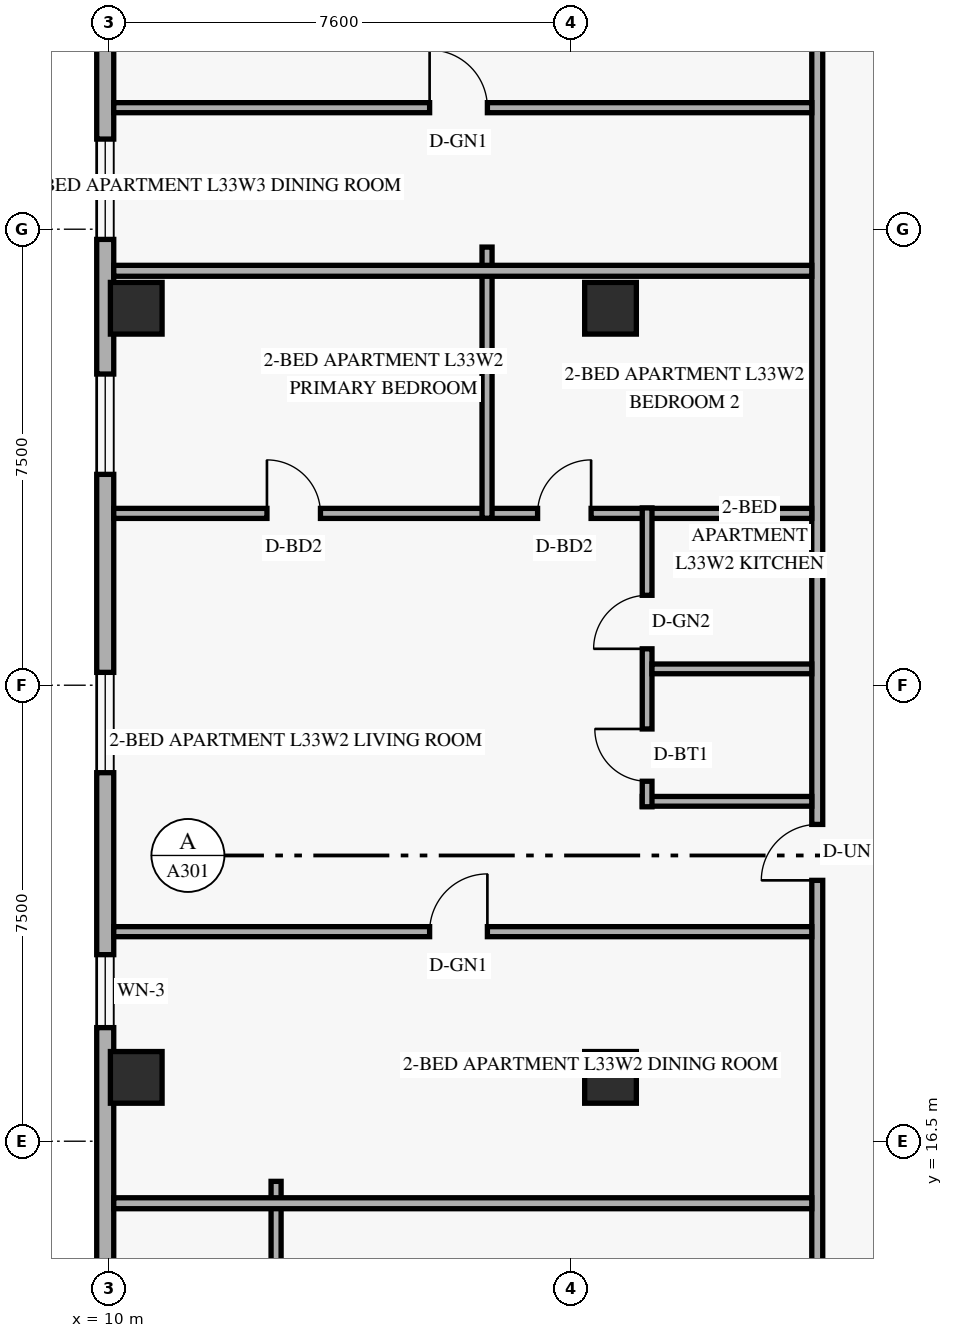
"""IFC4 building model, lengths in metres.
Left out: names, types, materials, properties, quantities, classifications, styles, units other than length and angle.
Written with IfcOpenShell. Run it as: python <this file> out.ifc"""

import sys

from ifc_helpers import new_model, si_unit, direction, frame, frame_2d, origin, origin_2d, place, context, subcontext, project, spatial, rectangle, extrude, element, fill, save


model = new_model("IFC4")
c1 = context("Model", 3, precision=1e-05, world=origin(), true_north=direction((0.0, 1.0)))
c2 = subcontext(c1, "Body", "Model", "MODEL_VIEW")
j1 = project(units=[si_unit("LENGTHUNIT", "METRE"), si_unit("PLANEANGLEUNIT", "RADIAN")], contexts=[c1])
p1 = place(None, origin())
s1 = spatial("IfcSite", under=j1, at=p1, CompositionType="ELEMENT")
p2 = place(p1, origin())
s2 = spatial("IfcBuilding", under=s1, at=p2, CompositionType="ELEMENT")
p3 = place(p2, frame((0.0, 0.0, 128.4)))
s3 = spatial("IfcBuildingStorey", under=s2, at=p3, CompositionType="ELEMENT", Elevation=128.4)
for number, where, z_axis, x_axis in (
    (1, (10.45, 17.55, 0.0), (0.0, 0.0, 1.0), (1.0, 0.0, 0.0)),
    (2, (10.45, 30.2, 0.0), (0.0, 0.0, 1.0), (1.0, 0.0, 0.0)),
    (3, (18.25, 17.55, 0.0), (0.0, 0.0, 1.0), (1.0, 0.0, 0.0)),
    (4, (18.25, 30.2, 0.0), (0.0, 0.0, 1.0), (1.0, 0.0, 0.0)),
):
    element("IfcColumn", number, at=place(p3, frame(where, z_axis=z_axis, x_axis=x_axis)), inside=s3, PredefinedType="COLUMN", context=c2, shape_type="SweptSolid", body=[
        extrude(rectangle(XDim=0.85, YDim=0.85, at=origin_2d()), origin(), (0.0, 0.0, 1.0), 3.6),
    ])
p4 = place(p3, frame((9.94, 41.68, 0.0), z_axis=(0.0, 0.0, 1.0), x_axis=(0.0, -1.0, 0.0)))
e5 = element("IfcWall", 5, at=p4, inside=s3, PredefinedType="SOLIDWALL", context=c2, shape_type="SweptSolid", body=[
    extrude(rectangle(XDim=35.36, YDim=0.28, at=frame_2d((17.68, 0.0))), origin(), (0.0, 0.0, 1.0), 3.36),
])
p5 = place(p4, frame((28.27, 0.0, 0.85)))
e6 = element("IfcOpeningElement", 6, at=p5, cuts=e5, PredefinedType="OPENING", context=c2, shape_type="SweptSolid", body=[
    extrude(rectangle(XDim=1.65, YDim=1.6, at=frame_2d((0.825, 0.8))), frame((0.0, 0.15, 0.0), z_axis=(0.0, -1.0, 0.0), x_axis=(1.0, 0.0, 0.0)), (0.0, 0.0, 1.0), 0.3),
])
p6 = place(p4, frame((22.112, 0.0, 0.85)))
e7 = element("IfcOpeningElement", 7, at=p6, cuts=e5, PredefinedType="OPENING", context=c2, shape_type="SweptSolid", body=[
    extrude(rectangle(XDim=1.2, YDim=1.5, at=frame_2d((0.6, 0.75))), frame((0.0, 0.15, 0.0), z_axis=(0.0, -1.0, 0.0), x_axis=(1.0, 0.0, 0.0)), (0.0, 0.0, 1.0), 0.3),
])
p7 = place(p4, frame((17.469, 0.0, 0.85)))
e8 = element("IfcOpeningElement", 8, at=p7, cuts=e5, PredefinedType="OPENING", context=c2, shape_type="SweptSolid", body=[
    extrude(rectangle(XDim=1.65, YDim=1.6, at=frame_2d((0.825, 0.8))), frame((0.0, 0.15, 0.0), z_axis=(0.0, -1.0, 0.0), x_axis=(1.0, 0.0, 0.0)), (0.0, 0.0, 1.0), 0.3),
])
p8 = place(p4, frame((12.562, 0.0, 0.85)))
e9 = element("IfcOpeningElement", 9, at=p8, cuts=e5, PredefinedType="OPENING", context=c2, shape_type="SweptSolid", body=[
    extrude(rectangle(XDim=1.65, YDim=1.6, at=frame_2d((0.825, 0.8))), frame((0.0, 0.15, 0.0), z_axis=(0.0, -1.0, 0.0), x_axis=(1.0, 0.0, 0.0)), (0.0, 0.0, 1.0), 0.3),
])
p9 = place(p4, frame((8.698, 0.0, 0.85)))
e10 = element("IfcOpeningElement", 10, at=p9, cuts=e5, PredefinedType="OPENING", context=c2, shape_type="SweptSolid", body=[
    extrude(rectangle(XDim=1.65, YDim=1.6, at=frame_2d((0.825, 0.8))), frame((0.0, 0.15, 0.0), z_axis=(0.0, -1.0, 0.0), x_axis=(1.0, 0.0, 0.0)), (0.0, 0.0, 1.0), 0.3),
])
p10 = place(p4, frame((4.95, 0.0, 0.85)))
e11 = element("IfcOpeningElement", 11, at=p10, cuts=e5, PredefinedType="OPENING", context=c2, shape_type="SweptSolid", body=[
    extrude(rectangle(XDim=1.65, YDim=1.6, at=frame_2d((0.825, 0.8))), frame((0.0, 0.15, 0.0), z_axis=(0.0, -1.0, 0.0), x_axis=(1.0, 0.0, 0.0)), (0.0, 0.0, 1.0), 0.3),
])
p11 = place(p3, frame((21.65, 6.8, 0.0), z_axis=(0.0, 0.0, 1.0), x_axis=(0.0, 1.0, 0.0)))
e12 = element("IfcWall", 12, at=p11, inside=s3, PredefinedType="STANDARD", context=c2, shape_type="SweptSolid", body=[
    extrude(rectangle(XDim=34.4, YDim=0.18, at=frame_2d((17.2, 0.0))), origin(), (0.0, 0.0, 1.0), 2.731),
])
p12 = place(p11, frame((5.107, 0.0, 0.0)))
e13 = element("IfcOpeningElement", 13, at=p12, cuts=e12, PredefinedType="OPENING", context=c2, shape_type="SweptSolid", body=[
    extrude(rectangle(XDim=0.92, YDim=2.15, at=frame_2d((0.46, 1.075))), frame((0.0, 0.1, 0.0), z_axis=(0.0, -1.0, 0.0), x_axis=(1.0, 0.0, 0.0)), (0.0, 0.0, 1.0), 0.2),
])
p13 = place(p11, frame((13.99, 0.0, 0.0)))
e14 = element("IfcOpeningElement", 14, at=p13, cuts=e12, PredefinedType="OPENING", context=c2, shape_type="SweptSolid", body=[
    extrude(rectangle(XDim=0.92, YDim=2.15, at=frame_2d((0.46, 1.075))), frame((0.0, 0.1, 0.0), z_axis=(0.0, -1.0, 0.0), x_axis=(1.0, 0.0, 0.0)), (0.0, 0.0, 1.0), 0.2),
])
p14 = place(p11, frame((28.646, 0.0, 0.0)))
e15 = element("IfcOpeningElement", 15, at=p14, cuts=e12, PredefinedType="OPENING", context=c2, shape_type="SweptSolid", body=[
    extrude(rectangle(XDim=0.92, YDim=2.15, at=frame_2d((0.46, 1.075))), frame((0.0, 0.1, 0.0), z_axis=(0.0, -1.0, 0.0), x_axis=(1.0, 0.0, 0.0)), (0.0, 0.0, 1.0), 0.2),
])
p15 = place(p3, frame((12.75, 6.76, 0.0), z_axis=(0.0, 0.0, 1.0), x_axis=(0.0, 1.0, 0.0)))
e16 = element("IfcWall", 16, at=p15, inside=s3, PredefinedType="PARTITIONING", context=c2, shape_type="SweptSolid", body=[
    extrude(rectangle(XDim=9.08, YDim=0.165, at=frame_2d((4.54, 0.0))), origin(), (0.0, 0.0, 1.0), 2.731),
])
p16 = place(p15, frame((3.78, 0.0, 0.0)))
e17 = element("IfcOpeningElement", 17, at=p16, cuts=e16, PredefinedType="OPENING", context=c2, shape_type="SweptSolid", body=[
    extrude(rectangle(XDim=0.95, YDim=2.15, at=frame_2d((0.475, 1.075))), frame((0.0, 0.093, 0.0), z_axis=(0.0, -1.0, 0.0), x_axis=(1.0, 0.0, 0.0)), (0.0, 0.0, 1.0), 0.185),
])
p17 = place(p3, frame((10.08, 15.48, 0.0), z_axis=(0.0, 0.0, 1.0), x_axis=(1.0, 0.0, 0.0)))
e18 = element("IfcWall", 18, at=p17, inside=s3, PredefinedType="PARTITIONING", context=c2, shape_type="SweptSolid", body=[
    extrude(rectangle(XDim=11.48, YDim=0.18, at=frame_2d((5.74, 0.0))), origin(), (0.0, 0.0, 1.0), 2.731),
])
p18 = place(p3, frame((10.08, 26.826, 0.0), z_axis=(0.0, 0.0, 1.0), x_axis=(1.0, 0.0, 0.0)))
e19 = element("IfcWall", 19, at=p18, inside=s3, PredefinedType="PARTITIONING", context=c2, shape_type="SweptSolid", body=[
    extrude(rectangle(XDim=11.48, YDim=0.165, at=frame_2d((5.74, 0.0))), origin(), (0.0, 0.0, 1.0), 2.731),
])
p19 = place(p18, frame((2.52, 0.0, 0.0)))
e20 = element("IfcOpeningElement", 20, at=p19, cuts=e19, PredefinedType="OPENING", context=c2, shape_type="SweptSolid", body=[
    extrude(rectangle(XDim=0.88, YDim=2.14, at=frame_2d((0.44, 1.07))), frame((0.0, 0.093, 0.0), z_axis=(0.0, -1.0, 0.0), x_axis=(1.0, 0.0, 0.0)), (0.0, 0.0, 1.0), 0.185),
])
p20 = place(p18, frame((6.971, 0.0, 0.0)))
e21 = element("IfcOpeningElement", 21, at=p20, cuts=e19, PredefinedType="OPENING", context=c2, shape_type="SweptSolid", body=[
    extrude(rectangle(XDim=0.88, YDim=2.14, at=frame_2d((0.44, 1.07))), frame((0.0, 0.093, 0.0), z_axis=(0.0, -1.0, 0.0), x_axis=(1.0, 0.0, 0.0)), (0.0, 0.0, 1.0), 0.185),
])
p21 = place(p3, frame((18.772, 22.091, 0.0), z_axis=(0.0, 0.0, 1.0), x_axis=(1.0, 0.0, 0.0)))
e22 = element("IfcWall", 22, at=p21, inside=s3, PredefinedType="PLUMBINGWALL", context=c2, shape_type="SweptSolid", body=[
    extrude(rectangle(XDim=2.788, YDim=0.16, at=frame_2d((1.394, 0.0))), origin(), (0.0, 0.0, 1.0), 3.36),
])
p22 = place(p3, frame((18.852, 22.0, 0.0), z_axis=(0.0, 0.0, 1.0), x_axis=(0.0, 1.0, 0.0)))
e23 = element("IfcWall", 23, at=p22, inside=s3, PredefinedType="PLUMBINGWALL", context=c2, shape_type="SweptSolid", body=[
    extrude(rectangle(XDim=4.916, YDim=0.16, at=frame_2d((2.458, 0.0))), origin(), (0.0, 0.0, 1.0), 3.36),
])
p23 = place(p22, frame((0.42, 0.0, 0.0)))
e24 = element("IfcOpeningElement", 24, at=p23, cuts=e23, PredefinedType="OPENING", context=c2, shape_type="SweptSolid", body=[
    extrude(rectangle(XDim=0.86, YDim=2.12, at=frame_2d((0.43, 1.06))), frame((0.0, 0.09, 0.0), z_axis=(0.0, -1.0, 0.0), x_axis=(1.0, 0.0, 0.0)), (0.0, 0.0, 1.0), 0.18),
])
p24 = place(p22, frame((2.598, 0.0, 0.0)))
e25 = element("IfcOpeningElement", 25, at=p24, cuts=e23, PredefinedType="OPENING", context=c2, shape_type="SweptSolid", body=[
    extrude(rectangle(XDim=0.88, YDim=2.12, at=frame_2d((0.44, 1.06))), frame((0.0, 0.09, 0.0), z_axis=(0.0, -1.0, 0.0), x_axis=(1.0, 0.0, 0.0)), (0.0, 0.0, 1.0), 0.18),
])
p25 = place(p3, frame((18.932, 24.269, 0.0), z_axis=(0.0, 0.0, 1.0), x_axis=(1.0, 0.0, 0.0)))
e26 = element("IfcWall", 26, at=p25, inside=s3, PredefinedType="PLUMBINGWALL", context=c2, shape_type="SweptSolid", body=[
    extrude(rectangle(XDim=2.628, YDim=0.16, at=frame_2d((1.314, 0.0))), origin(), (0.0, 0.0, 1.0), 3.36),
])
p26 = place(p3, frame((10.08, 19.947, 0.0), z_axis=(0.0, 0.0, 1.0), x_axis=(1.0, 0.0, 0.0)))
e27 = element("IfcWall", 27, at=p26, inside=s3, PredefinedType="PARTITIONING", context=c2, shape_type="SweptSolid", body=[
    extrude(rectangle(XDim=11.48, YDim=0.165, at=frame_2d((5.74, 0.0))), origin(), (0.0, 0.0, 1.0), 2.731),
])
p27 = place(p26, frame((5.195, 0.0, 0.0)))
e28 = element("IfcOpeningElement", 28, at=p27, cuts=e27, PredefinedType="OPENING", context=c2, shape_type="SweptSolid", body=[
    extrude(rectangle(XDim=0.95, YDim=2.15, at=frame_2d((0.475, 1.075))), frame((0.0, 0.093, 0.0), z_axis=(0.0, -1.0, 0.0), x_axis=(1.0, 0.0, 0.0)), (0.0, 0.0, 1.0), 0.185),
])
p28 = place(p3, frame((16.219, 26.746, 0.0), z_axis=(0.0, 0.0, 1.0), x_axis=(0.0, 1.0, 0.0)))
e29 = element("IfcWall", 29, at=p28, inside=s3, PredefinedType="PARTITIONING", context=c2, shape_type="SweptSolid", body=[
    extrude(rectangle(XDim=4.46, YDim=0.165, at=frame_2d((2.23, 0.0))), origin(), (0.0, 0.0, 1.0), 2.731),
])
p29 = place(p3, frame((10.08, 30.816, 0.0), z_axis=(0.0, 0.0, 1.0), x_axis=(1.0, 0.0, 0.0)))
e30 = element("IfcWall", 30, at=p29, inside=s3, PredefinedType="PARTITIONING", context=c2, shape_type="SweptSolid", body=[
    extrude(rectangle(XDim=11.48, YDim=0.18, at=frame_2d((5.74, 0.0))), origin(), (0.0, 0.0, 1.0), 2.731),
])
p30 = place(p3, frame((10.08, 33.499, 0.0), z_axis=(0.0, 0.0, 1.0), x_axis=(1.0, 0.0, 0.0)))
e31 = element("IfcWall", 31, at=p30, inside=s3, PredefinedType="PARTITIONING", context=c2, shape_type="SweptSolid", body=[
    extrude(rectangle(XDim=11.48, YDim=0.165, at=frame_2d((5.74, 0.0))), origin(), (0.0, 0.0, 1.0), 2.731),
])
p31 = place(p30, frame((5.195, 0.0, 0.0)))
e32 = element("IfcOpeningElement", 32, at=p31, cuts=e31, PredefinedType="OPENING", context=c2, shape_type="SweptSolid", body=[
    extrude(rectangle(XDim=0.95, YDim=2.15, at=frame_2d((0.475, 1.075))), frame((0.0, 0.093, 0.0), z_axis=(0.0, -1.0, 0.0), x_axis=(1.0, 0.0, 0.0)), (0.0, 0.0, 1.0), 0.185),
])
p32 = place(p6, origin())
e33 = element("IfcWindow", 33, at=p32, inside=s3, PartitioningType="SINGLE_PANEL", PredefinedType="WINDOW", context=c2, shape_type="SweptSolid", body=[
    extrude(rectangle(XDim=1.2, YDim=1.5, at=frame_2d((0.6, 0.75))), frame((0.0, 0.03, 0.0), z_axis=(0.0, -1.0, 0.0), x_axis=(1.0, 0.0, 0.0)), (0.0, 0.0, 1.0), 0.06),
])
fill(e7, e33)
p33 = place(p7, origin())
e34 = element("IfcWindow", 34, at=p33, inside=s3, PartitioningType="SINGLE_PANEL", PredefinedType="WINDOW", context=c2, shape_type="SweptSolid", body=[
    extrude(rectangle(XDim=1.65, YDim=1.6, at=frame_2d((0.825, 0.8))), frame((0.0, 0.03, 0.0), z_axis=(0.0, -1.0, 0.0), x_axis=(1.0, 0.0, 0.0)), (0.0, 0.0, 1.0), 0.06),
])
fill(e8, e34)
p34 = place(p8, origin())
e35 = element("IfcWindow", 35, at=p34, inside=s3, PartitioningType="SINGLE_PANEL", PredefinedType="WINDOW", context=c2, shape_type="SweptSolid", body=[
    extrude(rectangle(XDim=1.65, YDim=1.6, at=frame_2d((0.825, 0.8))), frame((0.0, 0.03, 0.0), z_axis=(0.0, -1.0, 0.0), x_axis=(1.0, 0.0, 0.0)), (0.0, 0.0, 1.0), 0.06),
])
fill(e9, e35)
p35 = place(p9, origin())
e36 = element("IfcWindow", 36, at=p35, inside=s3, PartitioningType="SINGLE_PANEL", PredefinedType="WINDOW", context=c2, shape_type="SweptSolid", body=[
    extrude(rectangle(XDim=1.65, YDim=1.6, at=frame_2d((0.825, 0.8))), frame((0.0, 0.03, 0.0), z_axis=(0.0, -1.0, 0.0), x_axis=(1.0, 0.0, 0.0)), (0.0, 0.0, 1.0), 0.06),
])
fill(e10, e36)
p36 = place(p27, origin())
e37 = element("IfcDoor", 37, at=p36, inside=s3, OperationType="SINGLE_SWING_RIGHT", PredefinedType="DOOR", context=c2, shape_type="SweptSolid", body=[
    extrude(rectangle(XDim=0.95, YDim=2.15, at=frame_2d((0.475, 1.075))), frame((0.0, 0.025, 0.0), z_axis=(0.0, -1.0, 0.0), x_axis=(1.0, 0.0, 0.0)), (0.0, 0.0, 1.0), 0.05),
])
fill(e28, e37)
p37 = place(p13, origin())
e38 = element("IfcDoor", 38, at=p37, inside=s3, OperationType="SINGLE_SWING_LEFT", PredefinedType="DOOR", context=c2, shape_type="SweptSolid", body=[
    extrude(rectangle(XDim=0.92, YDim=2.15, at=frame_2d((0.46, 1.075))), frame((0.0, 0.025, 0.0), z_axis=(0.0, -1.0, 0.0), x_axis=(1.0, 0.0, 0.0)), (0.0, 0.0, 1.0), 0.05),
])
fill(e14, e38)
p38 = place(p23, origin())
e39 = element("IfcDoor", 39, at=p38, inside=s3, OperationType="SINGLE_SWING_RIGHT", PredefinedType="DOOR", context=c2, shape_type="SweptSolid", body=[
    extrude(rectangle(XDim=0.86, YDim=2.12, at=frame_2d((0.43, 1.06))), frame((0.0, 0.025, 0.0), z_axis=(0.0, -1.0, 0.0), x_axis=(1.0, 0.0, 0.0)), (0.0, 0.0, 1.0), 0.05),
])
fill(e24, e39)
p39 = place(p24, origin())
e40 = element("IfcDoor", 40, at=p39, inside=s3, OperationType="SINGLE_SWING_LEFT", PredefinedType="DOOR", context=c2, shape_type="SweptSolid", body=[
    extrude(rectangle(XDim=0.88, YDim=2.12, at=frame_2d((0.44, 1.06))), frame((0.0, 0.025, 0.0), z_axis=(0.0, -1.0, 0.0), x_axis=(1.0, 0.0, 0.0)), (0.0, 0.0, 1.0), 0.05),
])
fill(e25, e40)
p40 = place(p19, origin())
e41 = element("IfcDoor", 41, at=p40, inside=s3, OperationType="SINGLE_SWING_LEFT", PredefinedType="DOOR", context=c2, shape_type="SweptSolid", body=[
    extrude(rectangle(XDim=0.88, YDim=2.14, at=frame_2d((0.44, 1.07))), frame((0.0, 0.025, 0.0), z_axis=(0.0, -1.0, 0.0), x_axis=(1.0, 0.0, 0.0)), (0.0, 0.0, 1.0), 0.05),
])
fill(e20, e41)
p41 = place(p20, origin())
e42 = element("IfcDoor", 42, at=p41, inside=s3, OperationType="SINGLE_SWING_RIGHT", PredefinedType="DOOR", context=c2, shape_type="SweptSolid", body=[
    extrude(rectangle(XDim=0.88, YDim=2.14, at=frame_2d((0.44, 1.07))), frame((0.0, 0.025, 0.0), z_axis=(0.0, -1.0, 0.0), x_axis=(1.0, 0.0, 0.0)), (0.0, 0.0, 1.0), 0.05),
])
fill(e21, e42)
p42 = place(p31, origin())
e43 = element("IfcDoor", 43, at=p42, inside=s3, OperationType="SINGLE_SWING_LEFT", PredefinedType="DOOR", context=c2, shape_type="SweptSolid", body=[
    extrude(rectangle(XDim=0.95, YDim=2.15, at=frame_2d((0.475, 1.075))), frame((0.0, 0.025, 0.0), z_axis=(0.0, -1.0, 0.0), x_axis=(1.0, 0.0, 0.0)), (0.0, 0.0, 1.0), 0.05),
])
fill(e32, e43)
save(model, sys.argv[1])
